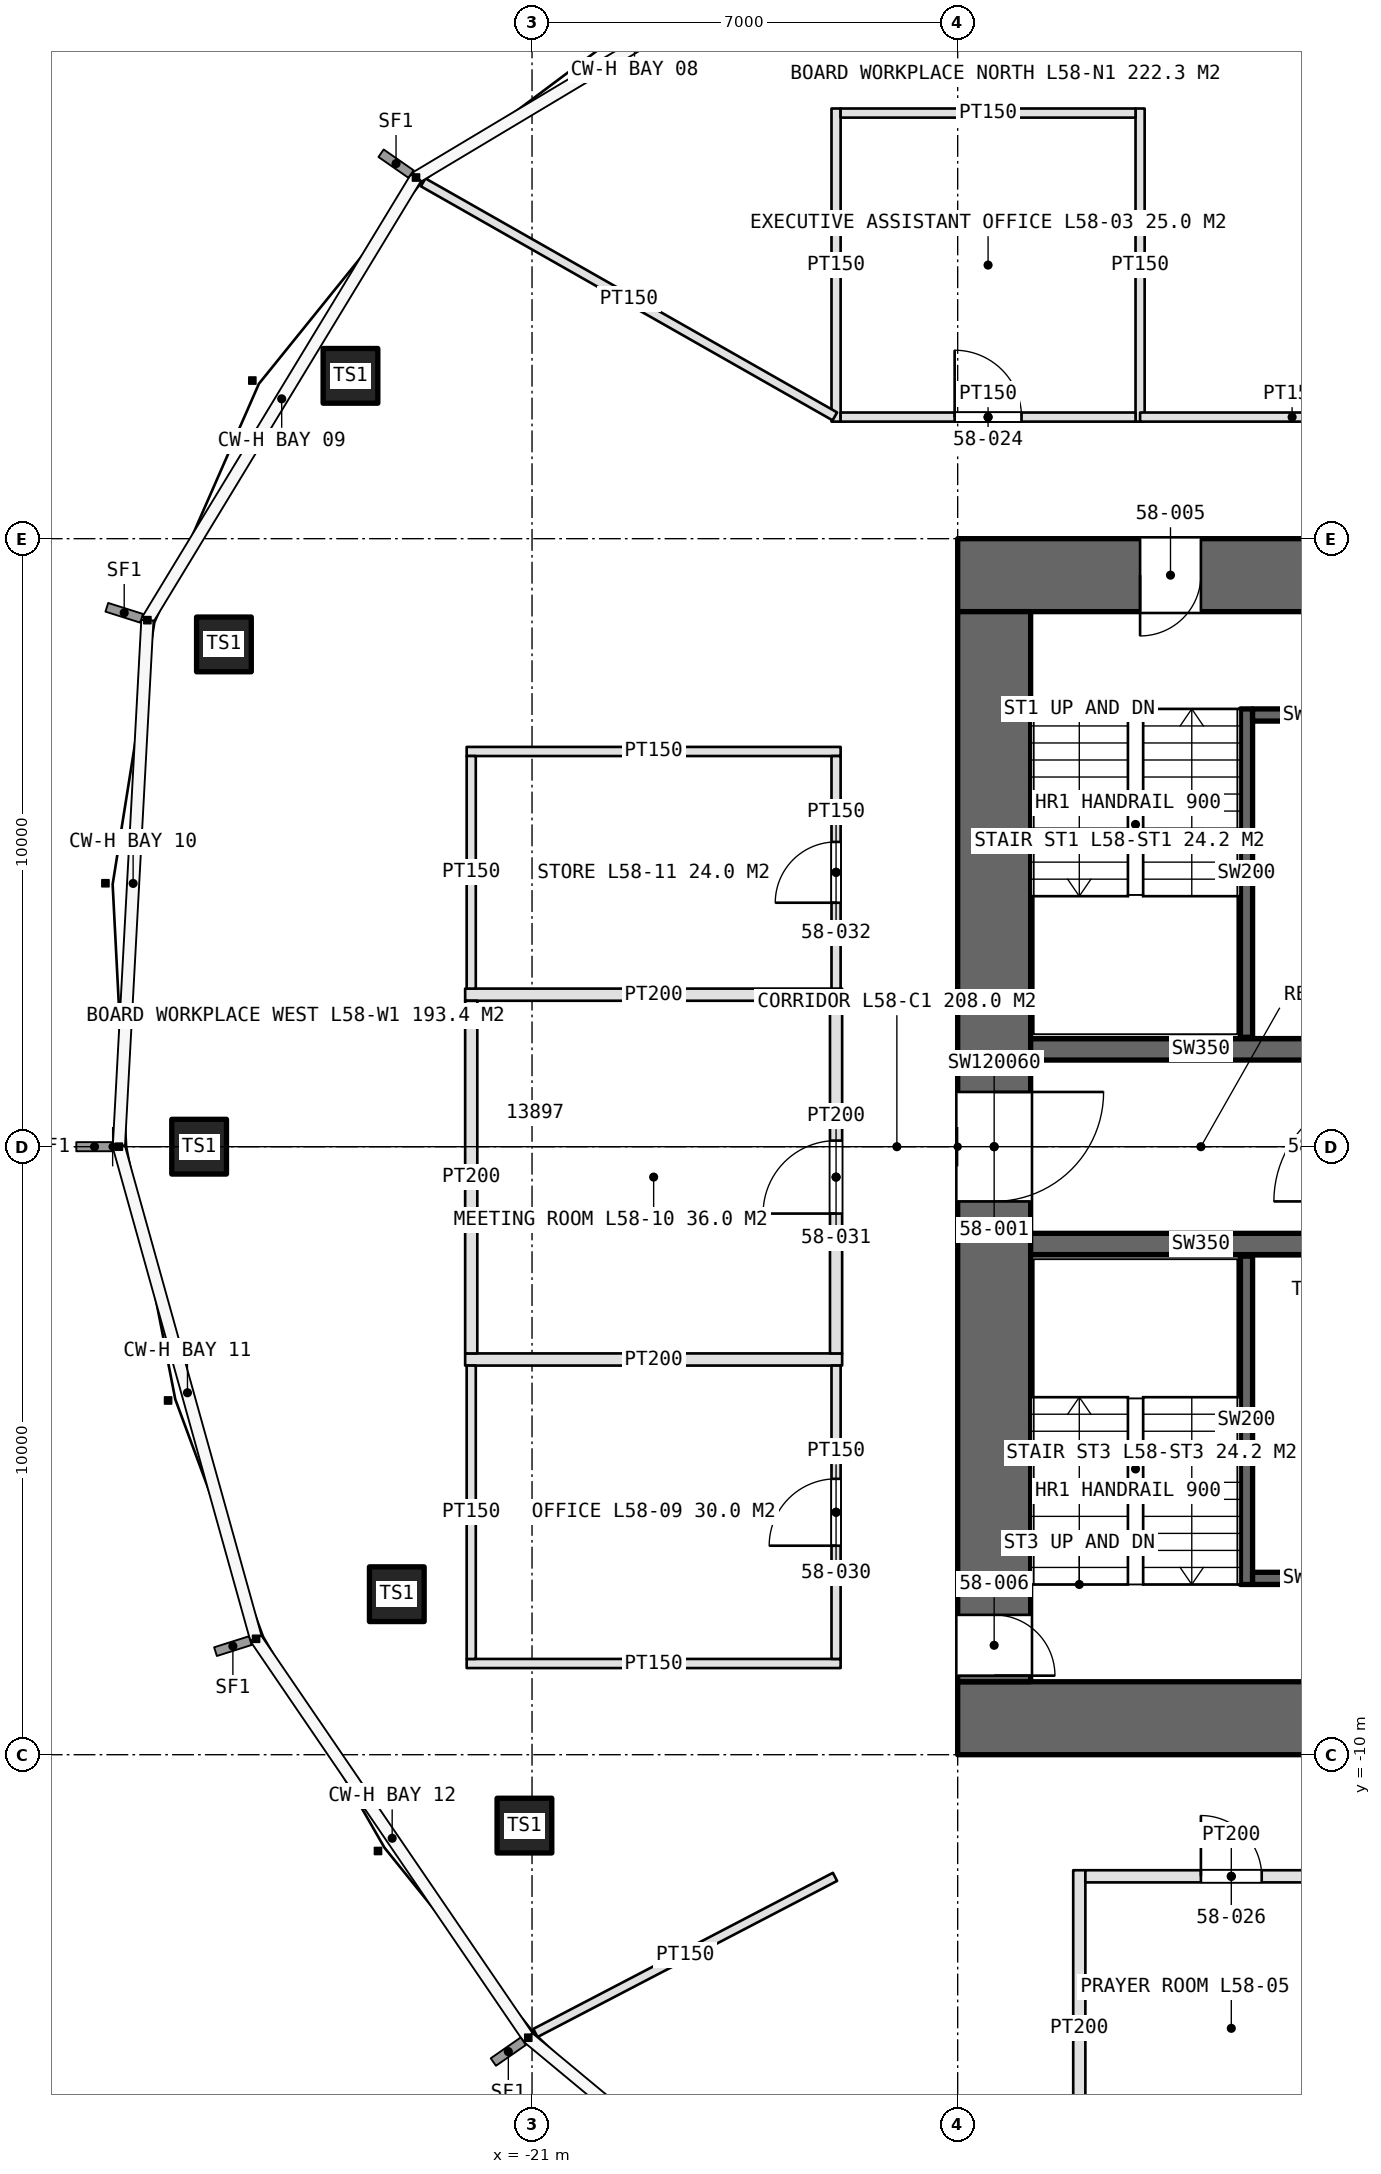
"""IFC4 building model, lengths in metres.
Left out: names, types, materials, properties, quantities, classifications, styles, units other than length and angle.
Written with IfcOpenShell. Run it as: python <this file> out.ifc"""

import sys

from ifc_helpers import new_model, si_unit, direction, frame, frame_2d, origin, origin_2d, place, context, subcontext, project, spatial, rectangle, hollow_rectangle, extrude, element, fill, save


model = new_model("IFC4")
c1 = context("Model", 3, precision=1e-05, world=origin(), true_north=direction((0.0, 1.0)))
c2 = subcontext(c1, "Body", "Model", "MODEL_VIEW")
j1 = project(units=[si_unit("LENGTHUNIT", "METRE"), si_unit("PLANEANGLEUNIT", "RADIAN")], contexts=[c1])
p1 = place(None, origin())
s1 = spatial("IfcSite", under=j1, at=p1, CompositionType="ELEMENT")
p2 = place(p1, origin())
s2 = spatial("IfcBuilding", under=s1, at=p2, CompositionType="ELEMENT")
p3 = place(p2, frame((0.0, 0.0, 262.0)))
s3 = spatial("IfcBuildingStorey", under=s2, at=p3, CompositionType="ELEMENT", Elevation=262.0)
p4 = place(p3, frame((-14.0, -9.4, 0.0), z_axis=(0.0, 0.0, 1.0), x_axis=(1.0, 0.0, 0.0)))
e1 = element("IfcWall", 1, at=p4, inside=s3, PredefinedType="SHEAR", context=c2, shape_type="SweptSolid", body=[
    extrude(rectangle(XDim=28.0, YDim=1.2, at=frame_2d((14.0, 0.0))), origin(), (0.0, 0.0, 1.0), 4.2),
])
p5 = place(p4, frame((22.9, 0.0, 0.0)))
e2 = element("IfcOpeningElement", 2, at=p5, cuts=e1, PredefinedType="OPENING", context=c2, shape_type="SweptSolid", body=[
    extrude(rectangle(XDim=2.2, YDim=2.7, at=frame_2d((1.1, 1.35))), frame((0.0, 0.61, 0.0), z_axis=(0.0, -1.0, 0.0), x_axis=(1.0, 0.0, 0.0)), (0.0, 0.0, 1.0), 1.22),
])
p6 = place(p3, frame((14.0, 9.4, 0.0), z_axis=(0.0, 0.0, 1.0), x_axis=(-1.0, 0.0, 0.0)))
e3 = element("IfcWall", 3, at=p6, inside=s3, PredefinedType="SHEAR", context=c2, shape_type="SweptSolid", body=[
    extrude(rectangle(XDim=28.0, YDim=1.2, at=frame_2d((14.0, 0.0))), origin(), (0.0, 0.0, 1.0), 4.2),
])
p7 = place(p6, frame((24.0, 0.0, 0.0)))
e4 = element("IfcOpeningElement", 4, at=p7, cuts=e3, PredefinedType="OPENING", context=c2, shape_type="SweptSolid", body=[
    extrude(rectangle(XDim=1.0, YDim=2.4, at=frame_2d((0.5, 1.2))), frame((0.0, 0.61, 0.0), z_axis=(0.0, -1.0, 0.0), x_axis=(1.0, 0.0, 0.0)), (0.0, 0.0, 1.0), 1.22),
])
p8 = place(p3, frame((-13.4, 8.8, 0.0), z_axis=(0.0, 0.0, 1.0), x_axis=(0.0, -1.0, 0.0)))
e5 = element("IfcWall", 5, at=p8, inside=s3, PredefinedType="SHEAR", context=c2, shape_type="SweptSolid", body=[
    extrude(rectangle(XDim=17.6, YDim=1.2, at=frame_2d((8.8, 0.0))), origin(), (0.0, 0.0, 1.0), 4.2),
])
p9 = place(p8, frame((7.9, 0.0, 0.0)))
e6 = element("IfcOpeningElement", 6, at=p9, cuts=e5, PredefinedType="OPENING", context=c2, shape_type="SweptSolid", body=[
    extrude(rectangle(XDim=1.8, YDim=2.4, at=frame_2d((0.9, 1.2))), frame((0.0, 0.61, 0.0), z_axis=(0.0, -1.0, 0.0), x_axis=(1.0, 0.0, 0.0)), (0.0, 0.0, 1.0), 1.22),
])
p10 = place(p8, frame((16.5, 0.0, 0.0)))
e7 = element("IfcOpeningElement", 7, at=p10, cuts=e5, PredefinedType="OPENING", context=c2, shape_type="SweptSolid", body=[
    extrude(rectangle(XDim=1.0, YDim=2.4, at=frame_2d((0.5, 1.2))), frame((0.0, 0.61, 0.0), z_axis=(0.0, -1.0, 0.0), x_axis=(1.0, 0.0, 0.0)), (0.0, 0.0, 1.0), 1.22),
])
for number, where, z_axis, x_axis in (
    (8, (-12.8, 1.6, 0.0), (0.0, 0.0, 1.0), (1.0, 0.0, 0.0)),
    (9, (-12.8, -1.6, 0.0), (0.0, 0.0, 1.0), (1.0, 0.0, 0.0)),
):
    element("IfcWall", number, at=place(p3, frame(where, z_axis=z_axis, x_axis=x_axis)), inside=s3, PredefinedType="SHEAR", context=c2, shape_type="SweptSolid", body=[
        extrude(rectangle(XDim=5.6, YDim=0.35, at=frame_2d((2.8, 0.0))), origin(), (0.0, 0.0, 1.0), 4.2),
    ])
for number, where, z_axis, x_axis in (
    (10, (-23.986, 12.678, 0.0), (0.0, 0.0, 1.0), (1.0, 0.0, 0.0)),
    (11, (-26.067, 8.261, 0.0), (0.0, 0.0, 1.0), (1.0, 0.0, 0.0)),
    (12, (-26.475, 0.0, 0.0), (0.0, 0.0, 1.0), (1.0, 0.0, 0.0)),
):
    element("IfcColumn", number, at=place(p3, frame(where, z_axis=z_axis, x_axis=x_axis)), inside=s3, PredefinedType="COLUMN", context=c2, shape_type="SweptSolid", body=[
        extrude(hollow_rectangle(XDim=0.9, YDim=0.9, WallThickness=0.08, at=origin_2d()), origin(), (0.0, 0.0, 1.0), 3.425),
    ])
for number, where, z_axis, x_axis in (
    (13, (-23.224, -7.36, 0.0), (0.0, 0.0, 1.0), (1.0, 0.0, 0.0)),
    (14, (-21.125, -11.166, 0.0), (0.0, 0.0, 1.0), (1.0, 0.0, 0.0)),
):
    element("IfcColumn", number, at=place(p3, frame(where, z_axis=z_axis, x_axis=x_axis)), inside=s3, PredefinedType="COLUMN", context=c2, shape_type="SweptSolid", body=[
        extrude(hollow_rectangle(XDim=0.9, YDim=0.9, WallThickness=0.08, at=origin_2d()), origin(), (0.0, 0.0, 1.0), 4.2),
    ])
p11 = place(p3, frame((-9.25, 7.2, 0.0), z_axis=(0.0, 0.0, 1.0), x_axis=(0.0, -1.0, 0.0)))
e15 = element("IfcWall", 15, at=p11, inside=s3, PredefinedType="SOLIDWALL", context=c2, shape_type="SweptSolid", body=[
    extrude(rectangle(XDim=5.4, YDim=0.2, at=frame_2d((2.7, 0.0))), origin(), (0.0, 0.0, 1.0), 4.2),
])
p12 = place(p3, frame((-9.15, 7.1, 0.0), z_axis=(0.0, 0.0, 1.0), x_axis=(1.0, 0.0, 0.0)))
e16 = element("IfcWall", 16, at=p12, inside=s3, PredefinedType="SOLIDWALL", context=c2, shape_type="SweptSolid", body=[
    extrude(rectangle(XDim=1.95, YDim=0.2, at=frame_2d((0.975, 0.0))), origin(), (0.0, 0.0, 1.0), 4.2),
])
p13 = place(p3, frame((-9.25, -7.2, 0.0), z_axis=(0.0, 0.0, 1.0), x_axis=(0.0, 1.0, 0.0)))
e17 = element("IfcWall", 17, at=p13, inside=s3, PredefinedType="SOLIDWALL", context=c2, shape_type="SweptSolid", body=[
    extrude(rectangle(XDim=5.4, YDim=0.2, at=frame_2d((2.7, 0.0))), origin(), (0.0, 0.0, 1.0), 4.2),
])
p14 = place(p3, frame((-9.15, -7.1, 0.0), z_axis=(0.0, 0.0, 1.0), x_axis=(1.0, 0.0, 0.0)))
e18 = element("IfcWall", 18, at=p14, inside=s3, PredefinedType="SOLIDWALL", context=c2, shape_type="SweptSolid", body=[
    extrude(rectangle(XDim=1.95, YDim=0.2, at=frame_2d((0.975, 0.0))), origin(), (0.0, 0.0, 1.0), 4.2),
])
for number, where, z_axis, x_axis in (
    (19, (-16.0, 11.925, 0.0), (0.0, 0.0, 1.0), (0.0, 1.0, 0.0)),
    (20, (-11.0, 11.925, 0.0), (0.0, 0.0, 1.0), (0.0, 1.0, 0.0)),
):
    element("IfcWall", number, at=place(p3, frame(where, z_axis=z_axis, x_axis=x_axis)), inside=s3, PredefinedType="PARTITIONING", context=c2, shape_type="SweptSolid", body=[
        extrude(rectangle(XDim=5.15, YDim=0.15, at=frame_2d((2.575, 0.0))), origin(), (0.0, 0.0, 1.0), 3.0),
    ])
p15 = place(p3, frame((-15.925, 12.0, 0.0), z_axis=(0.0, 0.0, 1.0), x_axis=(1.0, 0.0, 0.0)))
e21 = element("IfcWall", 21, at=p15, inside=s3, PredefinedType="PARTITIONING", context=c2, shape_type="SweptSolid", body=[
    extrude(rectangle(XDim=4.85, YDim=0.15, at=frame_2d((2.425, 0.0))), origin(), (0.0, 0.0, 1.0), 3.0),
])
p16 = place(p15, frame((1.875, 0.0, 0.0)))
e22 = element("IfcOpeningElement", 22, at=p16, cuts=e21, PredefinedType="OPENING", context=c2, shape_type="SweptSolid", body=[
    extrude(rectangle(XDim=1.1, YDim=2.3, at=frame_2d((0.55, 1.15))), frame((0.0, 0.085, 0.0), z_axis=(0.0, -1.0, 0.0), x_axis=(1.0, 0.0, 0.0)), (0.0, 0.0, 1.0), 0.17),
])
p17 = place(p3, frame((-15.925, 17.0, 0.0), z_axis=(0.0, 0.0, 1.0), x_axis=(1.0, 0.0, 0.0)))
e23 = element("IfcWall", 23, at=p17, inside=s3, PredefinedType="PARTITIONING", context=c2, shape_type="SweptSolid", body=[
    extrude(rectangle(XDim=4.85, YDim=0.15, at=frame_2d((2.425, 0.0))), origin(), (0.0, 0.0, 1.0), 3.0),
])
p18 = place(p3, frame((-12.0, -11.9, 0.0), z_axis=(0.0, 0.0, 1.0), x_axis=(0.0, -1.0, 0.0)))
e24 = element("IfcWall", 24, at=p18, inside=s3, PredefinedType="PARTITIONING", context=c2, shape_type="SweptSolid", body=[
    extrude(rectangle(XDim=5.2, YDim=0.2, at=frame_2d((2.6, 0.0))), origin(), (0.0, 0.0, 1.0), 3.0),
])
p19 = place(p3, frame((-11.9, -12.0, 0.0), z_axis=(0.0, 0.0, 1.0), x_axis=(1.0, 0.0, 0.0)))
e25 = element("IfcWall", 25, at=p19, inside=s3, PredefinedType="PARTITIONING", context=c2, shape_type="SweptSolid", body=[
    extrude(rectangle(XDim=4.8, YDim=0.2, at=frame_2d((2.4, 0.0))), origin(), (0.0, 0.0, 1.0), 3.0),
])
p20 = place(p19, frame((1.9, 0.0, 0.0)))
e26 = element("IfcOpeningElement", 26, at=p20, cuts=e25, PredefinedType="OPENING", context=c2, shape_type="SweptSolid", body=[
    extrude(rectangle(XDim=1.0, YDim=2.2, at=frame_2d((0.5, 1.1))), frame((0.0, 0.11, 0.0), z_axis=(0.0, -1.0, 0.0), x_axis=(1.0, 0.0, 0.0)), (0.0, 0.0, 1.0), 0.22),
])
p21 = place(p3, frame((-15.925, -8.5, 0.0), z_axis=(0.0, 0.0, 1.0), x_axis=(-1.0, 0.0, 0.0)))
e27 = element("IfcWall", 27, at=p21, inside=s3, PredefinedType="PARTITIONING", context=c2, shape_type="SweptSolid", body=[
    extrude(rectangle(XDim=6.15, YDim=0.15, at=frame_2d((3.075, 0.0))), origin(), (0.0, 0.0, 1.0), 3.0),
])
for number, where, z_axis, x_axis in (
    (28, (-15.9, -3.5, 0.0), (0.0, 0.0, 1.0), (-1.0, 0.0, 0.0)),
    (29, (-15.9, 2.5, 0.0), (0.0, 0.0, 1.0), (-1.0, 0.0, 0.0)),
):
    element("IfcWall", number, at=place(p3, frame(where, z_axis=z_axis, x_axis=x_axis)), inside=s3, PredefinedType="PARTITIONING", context=c2, shape_type="SweptSolid", body=[
        extrude(rectangle(XDim=6.2, YDim=0.2, at=frame_2d((3.1, 0.0))), origin(), (0.0, 0.0, 1.0), 3.0),
    ])
p22 = place(p3, frame((-15.925, 6.5, 0.0), z_axis=(0.0, 0.0, 1.0), x_axis=(-1.0, 0.0, 0.0)))
e30 = element("IfcWall", 30, at=p22, inside=s3, PredefinedType="PARTITIONING", context=c2, shape_type="SweptSolid", body=[
    extrude(rectangle(XDim=6.15, YDim=0.15, at=frame_2d((3.075, 0.0))), origin(), (0.0, 0.0, 1.0), 3.0),
])
p23 = place(p3, frame((-16.0, -8.425, 0.0), z_axis=(0.0, 0.0, 1.0), x_axis=(0.0, 1.0, 0.0)))
e31 = element("IfcWall", 31, at=p23, inside=s3, PredefinedType="PARTITIONING", context=c2, shape_type="SweptSolid", body=[
    extrude(rectangle(XDim=4.825, YDim=0.15, at=frame_2d((2.413, 0.0))), origin(), (0.0, 0.0, 1.0), 3.0),
])
p24 = place(p23, frame((1.863, 0.0, 0.0)))
e32 = element("IfcOpeningElement", 32, at=p24, cuts=e31, PredefinedType="OPENING", context=c2, shape_type="SweptSolid", body=[
    extrude(rectangle(XDim=1.1, YDim=2.3, at=frame_2d((0.55, 1.15))), frame((0.0, 0.085, 0.0), z_axis=(0.0, -1.0, 0.0), x_axis=(1.0, 0.0, 0.0)), (0.0, 0.0, 1.0), 0.17),
])
p25 = place(p3, frame((-22.0, -8.425, 0.0), z_axis=(0.0, 0.0, 1.0), x_axis=(0.0, 1.0, 0.0)))
e33 = element("IfcWall", 33, at=p25, inside=s3, PredefinedType="PARTITIONING", context=c2, shape_type="SweptSolid", body=[
    extrude(rectangle(XDim=4.825, YDim=0.15, at=frame_2d((2.413, 0.0))), origin(), (0.0, 0.0, 1.0), 3.0),
])
p26 = place(p3, frame((-16.0, -3.4, 0.0), z_axis=(0.0, 0.0, 1.0), x_axis=(0.0, 1.0, 0.0)))
e34 = element("IfcWall", 34, at=p26, inside=s3, PredefinedType="PARTITIONING", context=c2, shape_type="SweptSolid", body=[
    extrude(rectangle(XDim=5.8, YDim=0.2, at=frame_2d((2.9, 0.0))), origin(), (0.0, 0.0, 1.0), 3.0),
])
p27 = place(p26, frame((2.3, 0.0, 0.0)))
e35 = element("IfcOpeningElement", 35, at=p27, cuts=e34, PredefinedType="OPENING", context=c2, shape_type="SweptSolid", body=[
    extrude(rectangle(XDim=1.2, YDim=2.4, at=frame_2d((0.6, 1.2))), frame((0.0, 0.11, 0.0), z_axis=(0.0, -1.0, 0.0), x_axis=(1.0, 0.0, 0.0)), (0.0, 0.0, 1.0), 0.22),
])
p28 = place(p3, frame((-22.0, -3.4, 0.0), z_axis=(0.0, 0.0, 1.0), x_axis=(0.0, 1.0, 0.0)))
e36 = element("IfcWall", 36, at=p28, inside=s3, PredefinedType="PARTITIONING", context=c2, shape_type="SweptSolid", body=[
    extrude(rectangle(XDim=5.8, YDim=0.2, at=frame_2d((2.9, 0.0))), origin(), (0.0, 0.0, 1.0), 3.0),
])
p29 = place(p3, frame((-16.0, 2.6, 0.0), z_axis=(0.0, 0.0, 1.0), x_axis=(0.0, 1.0, 0.0)))
e37 = element("IfcWall", 37, at=p29, inside=s3, PredefinedType="PARTITIONING", context=c2, shape_type="SweptSolid", body=[
    extrude(rectangle(XDim=3.825, YDim=0.15, at=frame_2d((1.913, 0.0))), origin(), (0.0, 0.0, 1.0), 3.0),
])
p30 = place(p29, frame((1.413, 0.0, 0.0)))
e38 = element("IfcOpeningElement", 38, at=p30, cuts=e37, PredefinedType="OPENING", context=c2, shape_type="SweptSolid", body=[
    extrude(rectangle(XDim=1.0, YDim=2.2, at=frame_2d((0.5, 1.1))), frame((0.0, 0.085, 0.0), z_axis=(0.0, -1.0, 0.0), x_axis=(1.0, 0.0, 0.0)), (0.0, 0.0, 1.0), 0.17),
])
p31 = place(p3, frame((-22.0, 2.6, 0.0), z_axis=(0.0, 0.0, 1.0), x_axis=(0.0, 1.0, 0.0)))
e39 = element("IfcWall", 39, at=p31, inside=s3, PredefinedType="PARTITIONING", context=c2, shape_type="SweptSolid", body=[
    extrude(rectangle(XDim=3.825, YDim=0.15, at=frame_2d((1.913, 0.0))), origin(), (0.0, 0.0, 1.0), 3.0),
])
p32 = place(p3, frame((-16.018, -12.009, 0.0), z_axis=(0.0, 0.0, 1.0), x_axis=(-0.886831549241, -0.462092851351, 0.0)))
e40 = element("IfcWall", 40, at=p32, inside=s3, PredefinedType="PARTITIONING", context=c2, shape_type="SweptSolid", body=[
    extrude(rectangle(XDim=5.555, YDim=0.15, at=frame_2d((2.778, 0.0))), origin(), (0.0, 0.0, 1.0), 3.0),
])
p33 = place(p3, frame((-16.02, 12.011, 0.0), z_axis=(0.0, 0.0, 1.0), x_axis=(-0.869354026591, 0.494189818238, 0.0)))
e41 = element("IfcWall", 41, at=p33, inside=s3, PredefinedType="PARTITIONING", context=c2, shape_type="SweptSolid", body=[
    extrude(rectangle(XDim=7.788, YDim=0.15, at=frame_2d((3.894, 0.0))), origin(), (0.0, 0.0, 1.0), 3.0),
])
p34 = place(p3, frame((-6.0, 12.0, 0.0), z_axis=(0.0, 0.0, 1.0), x_axis=(-1.0, 0.0, 0.0)))
e42 = element("IfcWall", 42, at=p34, inside=s3, PredefinedType="PARTITIONING", context=c2, shape_type="SweptSolid", body=[
    extrude(rectangle(XDim=5.0, YDim=0.15, at=frame_2d((2.5, 0.0))), origin(), (0.0, 0.0, 1.0), 3.0),
])
p35 = place(p34, frame((0.4, 0.0, 0.0)))
e43 = element("IfcOpeningElement", 43, at=p35, cuts=e42, PredefinedType="OPENING", context=c2, shape_type="SweptSolid", body=[
    extrude(rectangle(XDim=1.6, YDim=2.4, at=frame_2d((0.8, 1.2))), frame((0.0, 0.085, 0.0), z_axis=(0.0, -1.0, 0.0), x_axis=(1.0, 0.0, 0.0)), (0.0, 0.0, 1.0), 0.17),
])
p36 = place(p9, origin())
e44 = element("IfcDoor", 44, at=p36, inside=s3, OperationType="DOUBLE_DOOR_SINGLE_SWING", PredefinedType="DOOR", context=c2, shape_type="SweptSolid", body=[
    extrude(rectangle(XDim=1.8, YDim=2.4, at=frame_2d((0.9, 1.2))), frame((0.0, 0.025, 0.0), z_axis=(0.0, -1.0, 0.0), x_axis=(1.0, 0.0, 0.0)), (0.0, 0.0, 1.0), 0.05),
])
fill(e6, e44)
p37 = place(p7, origin())
e45 = element("IfcDoor", 45, at=p37, inside=s3, OperationType="SINGLE_SWING_RIGHT", PredefinedType="DOOR", context=c2, shape_type="SweptSolid", body=[
    extrude(rectangle(XDim=1.0, YDim=2.4, at=frame_2d((0.5, 1.2))), frame((0.0, 0.025, 0.0), z_axis=(0.0, -1.0, 0.0), x_axis=(1.0, 0.0, 0.0)), (0.0, 0.0, 1.0), 0.05),
])
fill(e4, e45)
p38 = place(p10, origin())
e46 = element("IfcDoor", 46, at=p38, inside=s3, OperationType="SINGLE_SWING_RIGHT", PredefinedType="DOOR", context=c2, shape_type="SweptSolid", body=[
    extrude(rectangle(XDim=1.0, YDim=2.4, at=frame_2d((0.5, 1.2))), frame((0.0, 0.025, 0.0), z_axis=(0.0, -1.0, 0.0), x_axis=(1.0, 0.0, 0.0)), (0.0, 0.0, 1.0), 0.05),
])
fill(e7, e46)
p39 = place(p16, origin())
e47 = element("IfcDoor", 47, at=p39, inside=s3, OperationType="SINGLE_SWING_LEFT", PredefinedType="DOOR", context=c2, shape_type="SweptSolid", body=[
    extrude(rectangle(XDim=1.1, YDim=2.3, at=frame_2d((0.55, 1.15))), frame((0.0, 0.025, 0.0), z_axis=(0.0, -1.0, 0.0), x_axis=(1.0, 0.0, 0.0)), (0.0, 0.0, 1.0), 0.05),
])
fill(e22, e47)
p40 = place(p20, origin())
e48 = element("IfcDoor", 48, at=p40, inside=s3, OperationType="SINGLE_SWING_LEFT", PredefinedType="DOOR", context=c2, shape_type="SweptSolid", body=[
    extrude(rectangle(XDim=1.0, YDim=2.2, at=frame_2d((0.5, 1.1))), frame((0.0, 0.025, 0.0), z_axis=(0.0, -1.0, 0.0), x_axis=(1.0, 0.0, 0.0)), (0.0, 0.0, 1.0), 0.05),
])
fill(e26, e48)
p41 = place(p24, origin())
e49 = element("IfcDoor", 49, at=p41, inside=s3, OperationType="SINGLE_SWING_LEFT", PredefinedType="DOOR", context=c2, shape_type="SweptSolid", body=[
    extrude(rectangle(XDim=1.1, YDim=2.3, at=frame_2d((0.55, 1.15))), frame((0.0, 0.025, 0.0), z_axis=(0.0, -1.0, 0.0), x_axis=(1.0, 0.0, 0.0)), (0.0, 0.0, 1.0), 0.05),
])
fill(e32, e49)
p42 = place(p27, origin())
e50 = element("IfcDoor", 50, at=p42, inside=s3, OperationType="SINGLE_SWING_LEFT", PredefinedType="DOOR", context=c2, shape_type="SweptSolid", body=[
    extrude(rectangle(XDim=1.2, YDim=2.4, at=frame_2d((0.6, 1.2))), frame((0.0, 0.025, 0.0), z_axis=(0.0, -1.0, 0.0), x_axis=(1.0, 0.0, 0.0)), (0.0, 0.0, 1.0), 0.05),
])
fill(e35, e50)
p43 = place(p30, origin())
e51 = element("IfcDoor", 51, at=p43, inside=s3, OperationType="SINGLE_SWING_LEFT", PredefinedType="DOOR", context=c2, shape_type="SweptSolid", body=[
    extrude(rectangle(XDim=1.0, YDim=2.2, at=frame_2d((0.5, 1.1))), frame((0.0, 0.025, 0.0), z_axis=(0.0, -1.0, 0.0), x_axis=(1.0, 0.0, 0.0)), (0.0, 0.0, 1.0), 0.05),
])
fill(e38, e51)
save(model, sys.argv[1])
